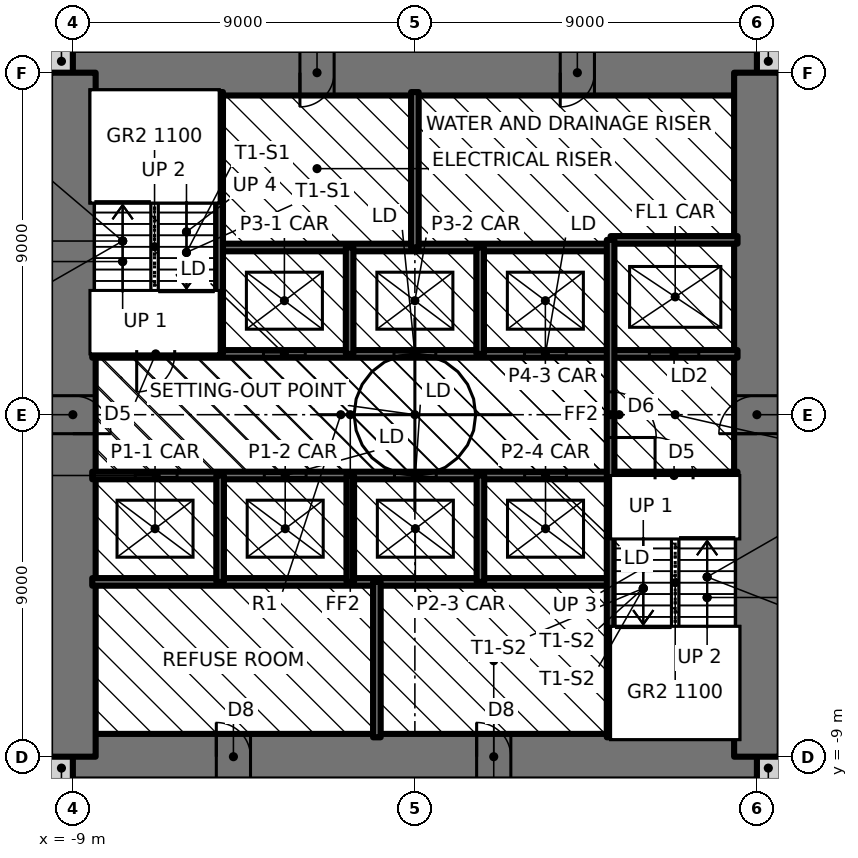
"""IFC4 building model, lengths in metres.
Left out: names, types, materials, properties, quantities, classifications, styles, units other than length and angle.
Written with IfcOpenShell. Run it as: python <this file> out.ifc"""

import sys

from ifc_helpers import new_model, si_unit, direction, frame, frame_2d, origin, place, context, subcontext, project, spatial, rectangle, extrude, element, fill, save


model = new_model("IFC4")
c1 = context("Model", 3, precision=1e-05, world=origin(), true_north=direction((0.0, 1.0)))
c2 = subcontext(c1, "Body", "Model", "MODEL_VIEW")
j1 = project(units=[si_unit("LENGTHUNIT", "METRE"), si_unit("PLANEANGLEUNIT", "RADIAN")], contexts=[c1])
p1 = place(None, origin())
s1 = spatial("IfcSite", under=j1, at=p1, CompositionType="ELEMENT")
p2 = place(p1, origin())
s2 = spatial("IfcBuilding", under=s1, at=p2, CompositionType="ELEMENT")
p3 = place(p2, origin())
s3 = spatial("IfcBuildingStorey", under=s2, at=p3, CompositionType="ELEMENT", Elevation=0.0)
for number, where, z_axis, x_axis in (
    (1, (-9.6, -9.3, 0.0), (0.0, 0.0, 1.0), (1.0, 0.0, 0.0)),
    (2, (9.0, -9.3, 0.0), (0.0, 0.0, 1.0), (1.0, 0.0, 0.0)),
    (3, (9.0, 9.3, 0.0), (0.0, 0.0, 1.0), (1.0, 0.0, 0.0)),
    (4, (-9.6, 9.3, 0.0), (0.0, 0.0, 1.0), (1.0, 0.0, 0.0)),
):
    element("IfcWall", number, at=place(p3, frame(where, z_axis=z_axis, x_axis=x_axis)), inside=s3, PredefinedType="SOLIDWALL", context=c2, shape_type="SweptSolid", body=[
        extrude(rectangle(XDim=0.6, YDim=0.6, at=frame_2d((0.3, 0.0))), origin(), (0.0, 0.0, 1.0), 6.0),
    ])
p4 = place(p3, frame((-9.0, -9.0, 0.0), z_axis=(0.0, 0.0, 1.0), x_axis=(1.0, 0.0, 0.0)))
e5 = element("IfcWall", 5, at=p4, inside=s3, PredefinedType="SHEAR", context=c2, shape_type="SweptSolid", body=[
    extrude(rectangle(XDim=18.0, YDim=1.2, at=frame_2d((9.0, 0.0))), origin(), (0.0, 0.0, 1.0), 6.0),
])
p5 = place(p4, frame((3.775, 0.0, 0.0)))
e6 = element("IfcOpeningElement", 6, at=p5, cuts=e5, PredefinedType="OPENING", context=c2, shape_type="SweptSolid", body=[
    extrude(rectangle(XDim=0.9, YDim=2.1, at=frame_2d((0.45, 1.05))), frame((0.0, 0.61, 0.0), z_axis=(0.0, -1.0, 0.0), x_axis=(1.0, 0.0, 0.0)), (0.0, 0.0, 1.0), 1.22),
])
p6 = place(p4, frame((10.625, 0.0, 0.0)))
e7 = element("IfcOpeningElement", 7, at=p6, cuts=e5, PredefinedType="OPENING", context=c2, shape_type="SweptSolid", body=[
    extrude(rectangle(XDim=0.9, YDim=2.1, at=frame_2d((0.45, 1.05))), frame((0.0, 0.61, 0.0), z_axis=(0.0, -1.0, 0.0), x_axis=(1.0, 0.0, 0.0)), (0.0, 0.0, 1.0), 1.22),
])
p7 = place(p3, frame((9.0, 9.0, 0.0), z_axis=(0.0, 0.0, 1.0), x_axis=(-1.0, 0.0, 0.0)))
e8 = element("IfcWall", 8, at=p7, inside=s3, PredefinedType="SHEAR", context=c2, shape_type="SweptSolid", body=[
    extrude(rectangle(XDim=18.0, YDim=1.2, at=frame_2d((9.0, 0.0))), origin(), (0.0, 0.0, 1.0), 6.0),
])
p8 = place(p7, frame((11.125, 0.0, 0.0)))
e9 = element("IfcOpeningElement", 9, at=p8, cuts=e8, PredefinedType="OPENING", context=c2, shape_type="SweptSolid", body=[
    extrude(rectangle(XDim=0.9, YDim=2.1, at=frame_2d((0.45, 1.05))), frame((0.0, 0.61, 0.0), z_axis=(0.0, -1.0, 0.0), x_axis=(1.0, 0.0, 0.0)), (0.0, 0.0, 1.0), 1.22),
])
p9 = place(p7, frame((4.275, 0.0, 0.0)))
e10 = element("IfcOpeningElement", 10, at=p9, cuts=e8, PredefinedType="OPENING", context=c2, shape_type="SweptSolid", body=[
    extrude(rectangle(XDim=0.9, YDim=2.1, at=frame_2d((0.45, 1.05))), frame((0.0, 0.61, 0.0), z_axis=(0.0, -1.0, 0.0), x_axis=(1.0, 0.0, 0.0)), (0.0, 0.0, 1.0), 1.22),
])
p10 = place(p3, frame((9.0, -9.0, 0.0), z_axis=(0.0, 0.0, 1.0), x_axis=(0.0, 1.0, 0.0)))
e11 = element("IfcWall", 11, at=p10, inside=s3, PredefinedType="SHEAR", context=c2, shape_type="SweptSolid", body=[
    extrude(rectangle(XDim=18.0, YDim=1.2, at=frame_2d((9.0, 0.0))), origin(), (0.0, 0.0, 1.0), 6.0),
])
p11 = place(p10, frame((8.5, 0.0, 0.0)))
e12 = element("IfcOpeningElement", 12, at=p11, cuts=e11, PredefinedType="OPENING", context=c2, shape_type="SweptSolid", body=[
    extrude(rectangle(XDim=1.0, YDim=2.1, at=frame_2d((0.5, 1.05))), frame((0.0, 0.61, 0.0), z_axis=(0.0, -1.0, 0.0), x_axis=(1.0, 0.0, 0.0)), (0.0, 0.0, 1.0), 1.22),
])
p12 = place(p3, frame((-9.0, 9.0, 0.0), z_axis=(0.0, 0.0, 1.0), x_axis=(0.0, -1.0, 0.0)))
e13 = element("IfcWall", 13, at=p12, inside=s3, PredefinedType="SHEAR", context=c2, shape_type="SweptSolid", body=[
    extrude(rectangle(XDim=18.0, YDim=1.2, at=frame_2d((9.0, 0.0))), origin(), (0.0, 0.0, 1.0), 6.0),
])
p13 = place(p12, frame((8.5, 0.0, 0.0)))
e14 = element("IfcOpeningElement", 14, at=p13, cuts=e13, PredefinedType="OPENING", context=c2, shape_type="SweptSolid", body=[
    extrude(rectangle(XDim=1.0, YDim=2.1, at=frame_2d((0.5, 1.05))), frame((0.0, 0.61, 0.0), z_axis=(0.0, -1.0, 0.0), x_axis=(1.0, 0.0, 0.0)), (0.0, 0.0, 1.0), 1.22),
])
p14 = place(p3, frame((-8.49, -4.4, 0.0), z_axis=(0.0, 0.0, 1.0), x_axis=(1.0, 0.0, 0.0)))
e15 = element("IfcWall", 15, at=p14, inside=s3, PredefinedType="SOLIDWALL", context=c2, shape_type="SweptSolid", body=[
    extrude(rectangle(XDim=13.64, YDim=0.2, at=frame_2d((6.82, 0.0))), origin(), (0.0, 0.0, 1.0), 6.0),
])
p15 = place(p3, frame((-8.49, -1.6, 0.0), z_axis=(0.0, 0.0, 1.0), x_axis=(1.0, 0.0, 0.0)))
e16 = element("IfcWall", 16, at=p15, inside=s3, PredefinedType="SOLIDWALL", context=c2, shape_type="SweptSolid", body=[
    extrude(rectangle(XDim=16.98, YDim=0.2, at=frame_2d((8.49, 0.0))), origin(), (0.0, 0.0, 1.0), 6.0),
])
p16 = place(p15, frame((14.81, 0.0, 0.0)))
e17 = element("IfcOpeningElement", 17, at=p16, cuts=e16, PredefinedType="OPENING", context=c2, shape_type="SweptSolid", body=[
    extrude(rectangle(XDim=1.0, YDim=2.1, at=frame_2d((0.5, 1.05))), frame((0.0, 0.11, 0.0), z_axis=(0.0, -1.0, 0.0), x_axis=(1.0, 0.0, 0.0)), (0.0, 0.0, 1.0), 0.22),
])
p17 = place(p15, frame((1.133, 0.0, 0.0)))
e18 = element("IfcOpeningElement", 18, at=p17, cuts=e16, PredefinedType="OPENING", context=c2, shape_type="SweptSolid", body=[
    extrude(rectangle(XDim=1.1, YDim=2.1, at=frame_2d((0.55, 1.05))), frame((0.0, 0.11, 0.0), z_axis=(0.0, -1.0, 0.0), x_axis=(1.0, 0.0, 0.0)), (0.0, 0.0, 1.0), 0.22),
])
p18 = place(p15, frame((4.528, 0.0, 0.0)))
e19 = element("IfcOpeningElement", 19, at=p18, cuts=e16, PredefinedType="OPENING", context=c2, shape_type="SweptSolid", body=[
    extrude(rectangle(XDim=1.1, YDim=2.1, at=frame_2d((0.55, 1.05))), frame((0.0, 0.11, 0.0), z_axis=(0.0, -1.0, 0.0), x_axis=(1.0, 0.0, 0.0)), (0.0, 0.0, 1.0), 0.22),
])
p19 = place(p15, frame((7.953, 0.0, 0.0)))
e20 = element("IfcOpeningElement", 20, at=p19, cuts=e16, PredefinedType="OPENING", context=c2, shape_type="SweptSolid", body=[
    extrude(rectangle(XDim=1.1, YDim=2.1, at=frame_2d((0.55, 1.05))), frame((0.0, 0.11, 0.0), z_axis=(0.0, -1.0, 0.0), x_axis=(1.0, 0.0, 0.0)), (0.0, 0.0, 1.0), 0.22),
])
p20 = place(p15, frame((11.378, 0.0, 0.0)))
e21 = element("IfcOpeningElement", 21, at=p20, cuts=e16, PredefinedType="OPENING", context=c2, shape_type="SweptSolid", body=[
    extrude(rectangle(XDim=1.1, YDim=2.1, at=frame_2d((0.55, 1.05))), frame((0.0, 0.11, 0.0), z_axis=(0.0, -1.0, 0.0), x_axis=(1.0, 0.0, 0.0)), (0.0, 0.0, 1.0), 0.22),
])
p21 = place(p3, frame((-8.49, 1.6, 0.0), z_axis=(0.0, 0.0, 1.0), x_axis=(1.0, 0.0, 0.0)))
e22 = element("IfcWall", 22, at=p21, inside=s3, PredefinedType="SOLIDWALL", context=c2, shape_type="SweptSolid", body=[
    extrude(rectangle(XDim=16.98, YDim=0.2, at=frame_2d((8.49, 0.0))), origin(), (0.0, 0.0, 1.0), 6.0),
])
p22 = place(p21, frame((1.17, 0.0, 0.0)))
e23 = element("IfcOpeningElement", 23, at=p22, cuts=e22, PredefinedType="OPENING", context=c2, shape_type="SweptSolid", body=[
    extrude(rectangle(XDim=1.0, YDim=2.1, at=frame_2d((0.5, 1.05))), frame((0.0, 0.11, 0.0), z_axis=(0.0, -1.0, 0.0), x_axis=(1.0, 0.0, 0.0)), (0.0, 0.0, 1.0), 0.22),
])
p23 = place(p21, frame((4.506, 0.0, 0.0)))
e24 = element("IfcOpeningElement", 24, at=p23, cuts=e22, PredefinedType="OPENING", context=c2, shape_type="SweptSolid", body=[
    extrude(rectangle(XDim=1.1, YDim=2.1, at=frame_2d((0.55, 1.05))), frame((0.0, 0.11, 0.0), z_axis=(0.0, -1.0, 0.0), x_axis=(1.0, 0.0, 0.0)), (0.0, 0.0, 1.0), 0.22),
])
p24 = place(p21, frame((7.94, 0.0, 0.0)))
e25 = element("IfcOpeningElement", 25, at=p24, cuts=e22, PredefinedType="OPENING", context=c2, shape_type="SweptSolid", body=[
    extrude(rectangle(XDim=1.1, YDim=2.1, at=frame_2d((0.55, 1.05))), frame((0.0, 0.11, 0.0), z_axis=(0.0, -1.0, 0.0), x_axis=(1.0, 0.0, 0.0)), (0.0, 0.0, 1.0), 0.22),
])
p25 = place(p21, frame((11.374, 0.0, 0.0)))
e26 = element("IfcOpeningElement", 26, at=p25, cuts=e22, PredefinedType="OPENING", context=c2, shape_type="SweptSolid", body=[
    extrude(rectangle(XDim=1.1, YDim=2.1, at=frame_2d((0.55, 1.05))), frame((0.0, 0.11, 0.0), z_axis=(0.0, -1.0, 0.0), x_axis=(1.0, 0.0, 0.0)), (0.0, 0.0, 1.0), 0.22),
])
p26 = place(p21, frame((14.66, 0.0, 0.0)))
e27 = element("IfcOpeningElement", 27, at=p26, cuts=e22, PredefinedType="OPENING", context=c2, shape_type="SweptSolid", body=[
    extrude(rectangle(XDim=1.3, YDim=2.1, at=frame_2d((0.65, 1.05))), frame((0.0, 0.11, 0.0), z_axis=(0.0, -1.0, 0.0), x_axis=(1.0, 0.0, 0.0)), (0.0, 0.0, 1.0), 0.22),
])
p27 = place(p3, frame((-5.15, 4.4, 0.0), z_axis=(0.0, 0.0, 1.0), x_axis=(1.0, 0.0, 0.0)))
e28 = element("IfcWall", 28, at=p27, inside=s3, PredefinedType="SOLIDWALL", context=c2, shape_type="SweptSolid", body=[
    extrude(rectangle(XDim=10.3, YDim=0.2, at=frame_2d((5.15, 0.0))), origin(), (0.0, 0.0, 1.0), 6.0),
])
p28 = place(p3, frame((5.15, 4.6, 0.0), z_axis=(0.0, 0.0, 1.0), x_axis=(1.0, 0.0, 0.0)))
e29 = element("IfcWall", 29, at=p28, inside=s3, PredefinedType="SOLIDWALL", context=c2, shape_type="SweptSolid", body=[
    extrude(rectangle(XDim=3.34, YDim=0.2, at=frame_2d((1.67, 0.0))), origin(), (0.0, 0.0, 1.0), 6.0),
])
p29 = place(p3, frame((5.15, -8.49, 0.0), z_axis=(0.0, 0.0, 1.0), x_axis=(0.0, 1.0, 0.0)))
e30 = element("IfcWall", 30, at=p29, inside=s3, PredefinedType="SOLIDWALL", context=c2, shape_type="SweptSolid", body=[
    extrude(rectangle(XDim=13.09, YDim=0.2, at=frame_2d((6.545, 0.0))), origin(), (0.0, 0.0, 1.0), 6.0),
])
p30 = place(p29, frame((7.89, 0.0, 0.0)))
e31 = element("IfcOpeningElement", 31, at=p30, cuts=e30, PredefinedType="OPENING", context=c2, shape_type="SweptSolid", body=[
    extrude(rectangle(XDim=1.2, YDim=2.1, at=frame_2d((0.6, 1.05))), frame((0.0, 0.11, 0.0), z_axis=(0.0, -1.0, 0.0), x_axis=(1.0, 0.0, 0.0)), (0.0, 0.0, 1.0), 0.22),
])
for number, where, z_axis, x_axis in (
    (32, (1.725, -4.4, 0.0), (0.0, 0.0, 1.0), (0.0, 1.0, 0.0)),
    (33, (1.717, 1.6, 0.0), (0.0, 0.0, 1.0), (0.0, 1.0, 0.0)),
):
    element("IfcWall", number, at=place(p3, frame(where, z_axis=z_axis, x_axis=x_axis)), inside=s3, PredefinedType="SOLIDWALL", context=c2, shape_type="SweptSolid", body=[
        extrude(rectangle(XDim=2.8, YDim=0.2, at=frame_2d((1.4, 0.0))), origin(), (0.0, 0.0, 1.0), 6.0),
    ])
for number, where, z_axis, x_axis in (
    (34, (0.0, 4.4, 0.0), (0.0, 0.0, 1.0), (0.0, 1.0, 0.0)),
    (35, (-1.0, -8.49, 0.0), (0.0, 0.0, 1.0), (0.0, 1.0, 0.0)),
):
    element("IfcWall", number, at=place(p3, frame(where, z_axis=z_axis, x_axis=x_axis)), inside=s3, PredefinedType="SOLIDWALL", context=c2, shape_type="SweptSolid", body=[
        extrude(rectangle(XDim=4.09, YDim=0.2, at=frame_2d((2.045, 0.0))), origin(), (0.0, 0.0, 1.0), 6.0),
    ])
for number, where, z_axis, x_axis in (
    (36, (-1.7, -4.4, 0.0), (0.0, 0.0, 1.0), (0.0, 1.0, 0.0)),
    (37, (-1.717, 1.6, 0.0), (0.0, 0.0, 1.0), (0.0, 1.0, 0.0)),
    (38, (-5.125, -4.4, 0.0), (0.0, 0.0, 1.0), (0.0, 1.0, 0.0)),
):
    element("IfcWall", number, at=place(p3, frame(where, z_axis=z_axis, x_axis=x_axis)), inside=s3, PredefinedType="SOLIDWALL", context=c2, shape_type="SweptSolid", body=[
        extrude(rectangle(XDim=2.8, YDim=0.2, at=frame_2d((1.4, 0.0))), origin(), (0.0, 0.0, 1.0), 6.0),
    ])
p31 = place(p3, frame((-5.15, 1.6, 0.0), z_axis=(0.0, 0.0, 1.0), x_axis=(0.0, 1.0, 0.0)))
e39 = element("IfcWall", 39, at=p31, inside=s3, PredefinedType="SOLIDWALL", context=c2, shape_type="SweptSolid", body=[
    extrude(rectangle(XDim=6.89, YDim=0.2, at=frame_2d((3.445, 0.0))), origin(), (0.0, 0.0, 1.0), 6.0),
])
p32 = place(p22, frame((1.0, 0.0, 0.0), z_axis=(0.0, 0.0, 1.0), x_axis=(-1.0, 0.0, 0.0)))
e40 = element("IfcDoor", 40, at=p32, inside=s3, OperationType="SINGLE_SWING_RIGHT", PredefinedType="DOOR", context=c2, shape_type="SweptSolid", body=[
    extrude(rectangle(XDim=1.0, YDim=2.1, at=frame_2d((0.5, 1.05))), frame((0.0, 0.025, 0.0), z_axis=(0.0, -1.0, 0.0), x_axis=(1.0, 0.0, 0.0)), (0.0, 0.0, 1.0), 0.05),
])
fill(e23, e40)
p33 = place(p16, origin())
e41 = element("IfcDoor", 41, at=p33, inside=s3, OperationType="SINGLE_SWING_LEFT", PredefinedType="DOOR", context=c2, shape_type="SweptSolid", body=[
    extrude(rectangle(XDim=1.0, YDim=2.1, at=frame_2d((0.5, 1.05))), frame((0.0, 0.025, 0.0), z_axis=(0.0, -1.0, 0.0), x_axis=(1.0, 0.0, 0.0)), (0.0, 0.0, 1.0), 0.05),
])
fill(e17, e41)
p34 = place(p30, frame((1.2, 0.0, 0.0), z_axis=(0.0, 0.0, 1.0), x_axis=(-1.0, 0.0, 0.0)))
e42 = element("IfcDoor", 42, at=p34, inside=s3, OperationType="SINGLE_SWING_RIGHT", PredefinedType="DOOR", context=c2, shape_type="SweptSolid", body=[
    extrude(rectangle(XDim=1.2, YDim=2.1, at=frame_2d((0.6, 1.05))), frame((0.0, 0.025, 0.0), z_axis=(0.0, -1.0, 0.0), x_axis=(1.0, 0.0, 0.0)), (0.0, 0.0, 1.0), 0.05),
])
fill(e31, e42)
p35 = place(p13, origin())
e43 = element("IfcDoor", 43, at=p35, inside=s3, OperationType="SINGLE_SWING_RIGHT", PredefinedType="DOOR", context=c2, shape_type="SweptSolid", body=[
    extrude(rectangle(XDim=1.0, YDim=2.1, at=frame_2d((0.5, 1.05))), frame((0.0, 0.025, 0.0), z_axis=(0.0, -1.0, 0.0), x_axis=(1.0, 0.0, 0.0)), (0.0, 0.0, 1.0), 0.05),
])
fill(e14, e43)
p36 = place(p11, origin())
e44 = element("IfcDoor", 44, at=p36, inside=s3, OperationType="SINGLE_SWING_LEFT", PredefinedType="DOOR", context=c2, shape_type="SweptSolid", body=[
    extrude(rectangle(XDim=1.0, YDim=2.1, at=frame_2d((0.5, 1.05))), frame((0.0, 0.025, 0.0), z_axis=(0.0, -1.0, 0.0), x_axis=(1.0, 0.0, 0.0)), (0.0, 0.0, 1.0), 0.05),
])
fill(e12, e44)
p37 = place(p8, origin())
e45 = element("IfcDoor", 45, at=p37, inside=s3, OperationType="SINGLE_SWING_RIGHT", PredefinedType="DOOR", context=c2, shape_type="SweptSolid", body=[
    extrude(rectangle(XDim=0.9, YDim=2.1, at=frame_2d((0.45, 1.05))), frame((0.0, 0.025, 0.0), z_axis=(0.0, -1.0, 0.0), x_axis=(1.0, 0.0, 0.0)), (0.0, 0.0, 1.0), 0.05),
])
fill(e9, e45)
p38 = place(p9, origin())
e46 = element("IfcDoor", 46, at=p38, inside=s3, OperationType="SINGLE_SWING_RIGHT", PredefinedType="DOOR", context=c2, shape_type="SweptSolid", body=[
    extrude(rectangle(XDim=0.9, YDim=2.1, at=frame_2d((0.45, 1.05))), frame((0.0, 0.025, 0.0), z_axis=(0.0, -1.0, 0.0), x_axis=(1.0, 0.0, 0.0)), (0.0, 0.0, 1.0), 0.05),
])
fill(e10, e46)
p39 = place(p5, origin())
e47 = element("IfcDoor", 47, at=p39, inside=s3, OperationType="SINGLE_SWING_LEFT", PredefinedType="DOOR", context=c2, shape_type="SweptSolid", body=[
    extrude(rectangle(XDim=0.9, YDim=2.1, at=frame_2d((0.45, 1.05))), frame((0.0, 0.025, 0.0), z_axis=(0.0, -1.0, 0.0), x_axis=(1.0, 0.0, 0.0)), (0.0, 0.0, 1.0), 0.05),
])
fill(e6, e47)
p40 = place(p6, origin())
e48 = element("IfcDoor", 48, at=p40, inside=s3, OperationType="SINGLE_SWING_LEFT", PredefinedType="DOOR", context=c2, shape_type="SweptSolid", body=[
    extrude(rectangle(XDim=0.9, YDim=2.1, at=frame_2d((0.45, 1.05))), frame((0.0, 0.025, 0.0), z_axis=(0.0, -1.0, 0.0), x_axis=(1.0, 0.0, 0.0)), (0.0, 0.0, 1.0), 0.05),
])
fill(e7, e48)
p41 = place(p17, origin())
e49 = element("IfcDoor", 49, at=p41, inside=s3, OperationType="DOUBLE_DOOR_SLIDING", PredefinedType="DOOR", context=c2, shape_type="SweptSolid", body=[
    extrude(rectangle(XDim=1.1, YDim=2.1, at=frame_2d((0.55, 1.05))), frame((0.0, 0.025, 0.0), z_axis=(0.0, -1.0, 0.0), x_axis=(1.0, 0.0, 0.0)), (0.0, 0.0, 1.0), 0.05),
])
fill(e18, e49)
p42 = place(p18, origin())
e50 = element("IfcDoor", 50, at=p42, inside=s3, OperationType="DOUBLE_DOOR_SLIDING", PredefinedType="DOOR", context=c2, shape_type="SweptSolid", body=[
    extrude(rectangle(XDim=1.1, YDim=2.1, at=frame_2d((0.55, 1.05))), frame((0.0, 0.025, 0.0), z_axis=(0.0, -1.0, 0.0), x_axis=(1.0, 0.0, 0.0)), (0.0, 0.0, 1.0), 0.05),
])
fill(e19, e50)
p43 = place(p19, origin())
e51 = element("IfcDoor", 51, at=p43, inside=s3, OperationType="DOUBLE_DOOR_SLIDING", PredefinedType="DOOR", context=c2, shape_type="SweptSolid", body=[
    extrude(rectangle(XDim=1.1, YDim=2.1, at=frame_2d((0.55, 1.05))), frame((0.0, 0.025, 0.0), z_axis=(0.0, -1.0, 0.0), x_axis=(1.0, 0.0, 0.0)), (0.0, 0.0, 1.0), 0.05),
])
fill(e20, e51)
p44 = place(p20, origin())
e52 = element("IfcDoor", 52, at=p44, inside=s3, OperationType="DOUBLE_DOOR_SLIDING", PredefinedType="DOOR", context=c2, shape_type="SweptSolid", body=[
    extrude(rectangle(XDim=1.1, YDim=2.1, at=frame_2d((0.55, 1.05))), frame((0.0, 0.025, 0.0), z_axis=(0.0, -1.0, 0.0), x_axis=(1.0, 0.0, 0.0)), (0.0, 0.0, 1.0), 0.05),
])
fill(e21, e52)
p45 = place(p23, origin())
e53 = element("IfcDoor", 53, at=p45, inside=s3, OperationType="DOUBLE_DOOR_SLIDING", PredefinedType="DOOR", context=c2, shape_type="SweptSolid", body=[
    extrude(rectangle(XDim=1.1, YDim=2.1, at=frame_2d((0.55, 1.05))), frame((0.0, 0.025, 0.0), z_axis=(0.0, -1.0, 0.0), x_axis=(1.0, 0.0, 0.0)), (0.0, 0.0, 1.0), 0.05),
])
fill(e24, e53)
p46 = place(p24, origin())
e54 = element("IfcDoor", 54, at=p46, inside=s3, OperationType="DOUBLE_DOOR_SLIDING", PredefinedType="DOOR", context=c2, shape_type="SweptSolid", body=[
    extrude(rectangle(XDim=1.1, YDim=2.1, at=frame_2d((0.55, 1.05))), frame((0.0, 0.025, 0.0), z_axis=(0.0, -1.0, 0.0), x_axis=(1.0, 0.0, 0.0)), (0.0, 0.0, 1.0), 0.05),
])
fill(e25, e54)
p47 = place(p25, origin())
e55 = element("IfcDoor", 55, at=p47, inside=s3, OperationType="DOUBLE_DOOR_SLIDING", PredefinedType="DOOR", context=c2, shape_type="SweptSolid", body=[
    extrude(rectangle(XDim=1.1, YDim=2.1, at=frame_2d((0.55, 1.05))), frame((0.0, 0.025, 0.0), z_axis=(0.0, -1.0, 0.0), x_axis=(1.0, 0.0, 0.0)), (0.0, 0.0, 1.0), 0.05),
])
fill(e26, e55)
p48 = place(p26, origin())
e56 = element("IfcDoor", 56, at=p48, inside=s3, OperationType="SLIDING_TO_LEFT", PredefinedType="DOOR", context=c2, shape_type="SweptSolid", body=[
    extrude(rectangle(XDim=1.3, YDim=2.1, at=frame_2d((0.65, 1.05))), frame((0.0, 0.025, 0.0), z_axis=(0.0, -1.0, 0.0), x_axis=(1.0, 0.0, 0.0)), (0.0, 0.0, 1.0), 0.05),
])
fill(e27, e56)
save(model, sys.argv[1])
